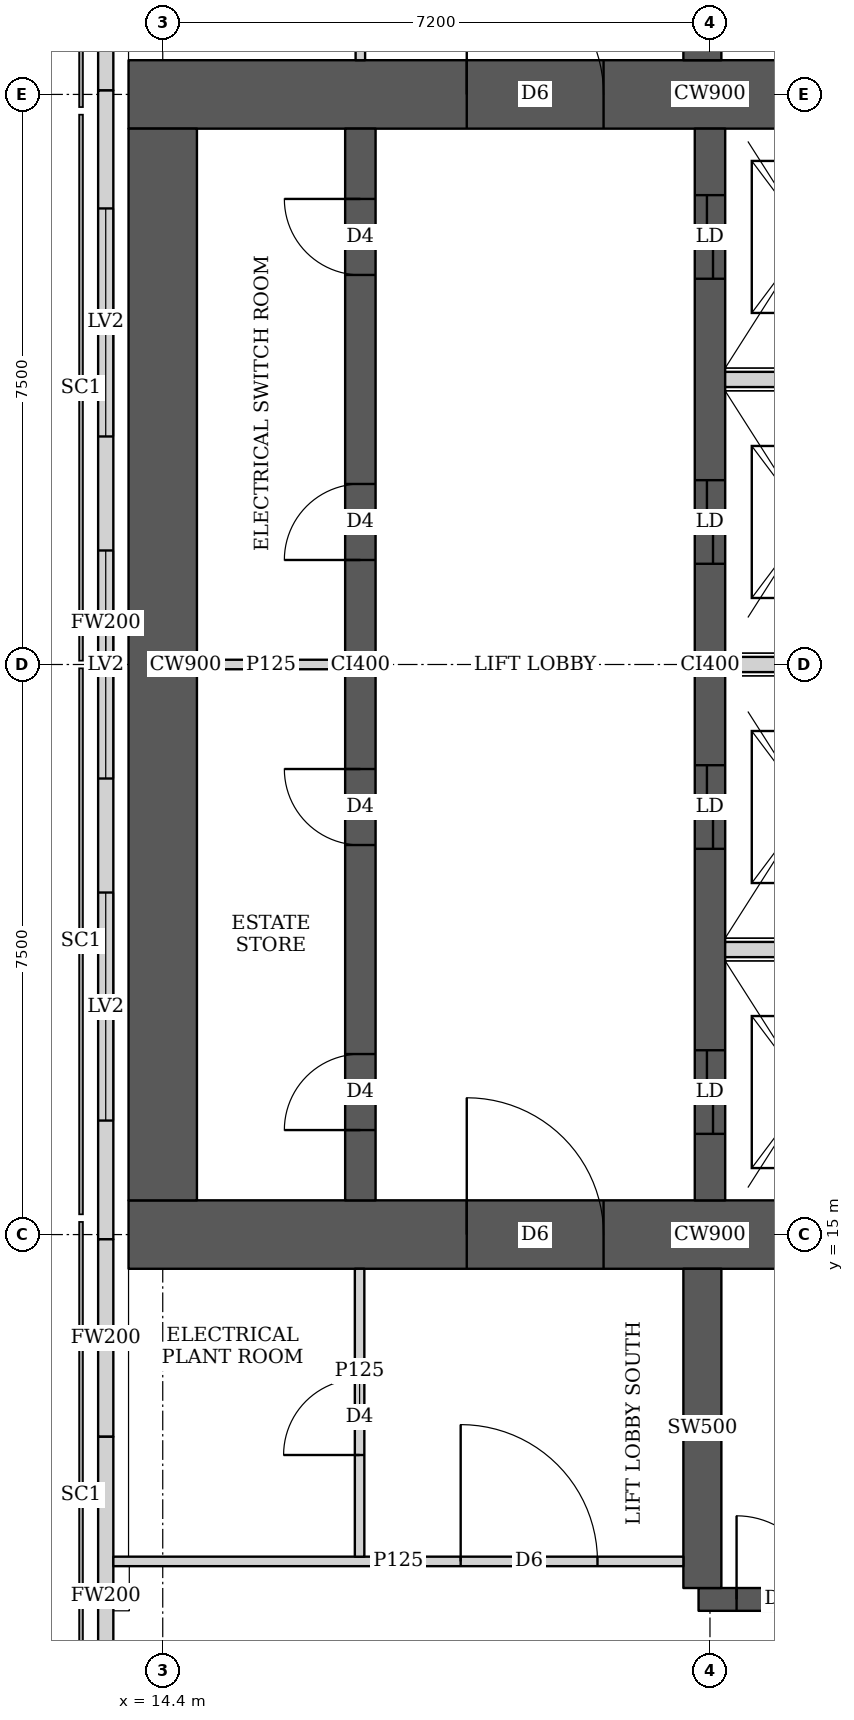
"""IFC4 building model, lengths in metres.
Left out: names, types, materials, properties, quantities, classifications, styles, units other than length and angle.
Written with IfcOpenShell. Run it as: python <this file> out.ifc"""

import sys

from ifc_helpers import new_model, si_unit, direction, frame, frame_2d, origin, place, context, subcontext, project, spatial, rectangle, extrude, element, fill, save


model = new_model("IFC4")
c1 = context("Model", 3, precision=1e-05, world=origin(), true_north=direction((0.0, 1.0)))
c2 = subcontext(c1, "Body", "Model", "MODEL_VIEW")
j1 = project(units=[si_unit("LENGTHUNIT", "METRE"), si_unit("PLANEANGLEUNIT", "RADIAN")], contexts=[c1])
p1 = place(None, origin())
s1 = spatial("IfcSite", under=j1, at=p1, CompositionType="ELEMENT")
p2 = place(p1, origin())
s2 = spatial("IfcBuilding", under=s1, at=p2, CompositionType="ELEMENT")
p3 = place(p2, frame((0.0, 0.0, 246.2)))
s3 = spatial("IfcBuildingStorey", under=s2, at=p3, CompositionType="ELEMENT", Elevation=246.2)
p4 = place(p3, frame((13.95, 15.0, 0.0), z_axis=(0.0, 0.0, 1.0), x_axis=(1.0, 0.0, 0.0)))
e1 = element("IfcWall", 1, at=p4, inside=s3, PredefinedType="SHEAR", context=c2, shape_type="SweptSolid", body=[
    extrude(rectangle(XDim=15.3, YDim=0.9, at=frame_2d((7.65, 0.0))), origin(), (0.0, 0.0, 1.0), 5.4),
])
p5 = place(p4, frame((4.45, 0.0, 0.0)))
e2 = element("IfcOpeningElement", 2, at=p5, cuts=e1, PredefinedType="OPENING", context=c2, shape_type="SweptSolid", body=[
    extrude(rectangle(XDim=1.8, YDim=2.1, at=frame_2d((0.9, 1.05))), frame((0.0, 0.46, 0.0), z_axis=(0.0, -1.0, 0.0), x_axis=(1.0, 0.0, 0.0)), (0.0, 0.0, 1.0), 0.92),
])
p6 = place(p4, frame((10.7, 0.0, 0.0)))
e3 = element("IfcOpeningElement", 3, at=p6, cuts=e1, PredefinedType="OPENING", context=c2, shape_type="SweptSolid", body=[
    extrude(rectangle(XDim=1.1, YDim=2.1, at=frame_2d((0.55, 1.05))), frame((0.0, 0.46, 0.0), z_axis=(0.0, -1.0, 0.0), x_axis=(1.0, 0.0, 0.0)), (0.0, 0.0, 1.0), 0.92),
])
p7 = place(p3, frame((13.95, 30.0, 0.0), z_axis=(0.0, 0.0, 1.0), x_axis=(1.0, 0.0, 0.0)))
e4 = element("IfcWall", 4, at=p7, inside=s3, PredefinedType="SHEAR", context=c2, shape_type="SweptSolid", body=[
    extrude(rectangle(XDim=15.3, YDim=0.9, at=frame_2d((7.65, 0.0))), origin(), (0.0, 0.0, 1.0), 5.4),
])
p8 = place(p7, frame((4.45, 0.0, 0.0)))
e5 = element("IfcOpeningElement", 5, at=p8, cuts=e4, PredefinedType="OPENING", context=c2, shape_type="SweptSolid", body=[
    extrude(rectangle(XDim=1.8, YDim=2.1, at=frame_2d((0.9, 1.05))), frame((0.0, 0.46, 0.0), z_axis=(0.0, -1.0, 0.0), x_axis=(1.0, 0.0, 0.0)), (0.0, 0.0, 1.0), 0.92),
])
p9 = place(p7, frame((10.7, 0.0, 0.0)))
e6 = element("IfcOpeningElement", 6, at=p9, cuts=e4, PredefinedType="OPENING", context=c2, shape_type="SweptSolid", body=[
    extrude(rectangle(XDim=1.1, YDim=2.1, at=frame_2d((0.55, 1.05))), frame((0.0, 0.46, 0.0), z_axis=(0.0, -1.0, 0.0), x_axis=(1.0, 0.0, 0.0)), (0.0, 0.0, 1.0), 0.92),
])
p10 = place(p3, frame((14.4, 15.45, 0.0), z_axis=(0.0, 0.0, 1.0), x_axis=(0.0, 1.0, 0.0)))
e7 = element("IfcWall", 7, at=p10, inside=s3, PredefinedType="SHEAR", context=c2, shape_type="SweptSolid", body=[
    extrude(rectangle(XDim=14.1, YDim=0.9, at=frame_2d((7.05, 0.0))), origin(), (0.0, 0.0, 1.0), 5.4),
])
p11 = place(p3, frame((17.0, 15.45, 0.0), z_axis=(0.0, 0.0, 1.0), x_axis=(0.0, 1.0, 0.0)))
e8 = element("IfcWall", 8, at=p11, inside=s3, PredefinedType="SHEAR", context=c2, shape_type="SweptSolid", body=[
    extrude(rectangle(XDim=14.1, YDim=0.4, at=frame_2d((7.05, 0.0))), origin(), (0.0, 0.0, 1.0), 5.4),
])
p12 = place(p11, frame((0.925, 0.0, 0.0)))
e9 = element("IfcOpeningElement", 9, at=p12, cuts=e8, PredefinedType="OPENING", context=c2, shape_type="SweptSolid", body=[
    extrude(rectangle(XDim=1.0, YDim=2.1, at=frame_2d((0.5, 1.05))), frame((0.0, 0.21, 0.0), z_axis=(0.0, -1.0, 0.0), x_axis=(1.0, 0.0, 0.0)), (0.0, 0.0, 1.0), 0.42),
])
p13 = place(p11, frame((4.675, 0.0, 0.0)))
e10 = element("IfcOpeningElement", 10, at=p13, cuts=e8, PredefinedType="OPENING", context=c2, shape_type="SweptSolid", body=[
    extrude(rectangle(XDim=1.0, YDim=2.1, at=frame_2d((0.5, 1.05))), frame((0.0, 0.21, 0.0), z_axis=(0.0, -1.0, 0.0), x_axis=(1.0, 0.0, 0.0)), (0.0, 0.0, 1.0), 0.42),
])
p14 = place(p11, frame((8.425, 0.0, 0.0)))
e11 = element("IfcOpeningElement", 11, at=p14, cuts=e8, PredefinedType="OPENING", context=c2, shape_type="SweptSolid", body=[
    extrude(rectangle(XDim=1.0, YDim=2.1, at=frame_2d((0.5, 1.05))), frame((0.0, 0.21, 0.0), z_axis=(0.0, -1.0, 0.0), x_axis=(1.0, 0.0, 0.0)), (0.0, 0.0, 1.0), 0.42),
])
p15 = place(p11, frame((12.175, 0.0, 0.0)))
e12 = element("IfcOpeningElement", 12, at=p15, cuts=e8, PredefinedType="OPENING", context=c2, shape_type="SweptSolid", body=[
    extrude(rectangle(XDim=1.0, YDim=2.1, at=frame_2d((0.5, 1.05))), frame((0.0, 0.21, 0.0), z_axis=(0.0, -1.0, 0.0), x_axis=(1.0, 0.0, 0.0)), (0.0, 0.0, 1.0), 0.42),
])
p16 = place(p3, frame((21.6, 15.45, 0.0), z_axis=(0.0, 0.0, 1.0), x_axis=(0.0, 1.0, 0.0)))
e13 = element("IfcWall", 13, at=p16, inside=s3, PredefinedType="SHEAR", context=c2, shape_type="SweptSolid", body=[
    extrude(rectangle(XDim=14.1, YDim=0.4, at=frame_2d((7.05, 0.0))), origin(), (0.0, 0.0, 1.0), 5.4),
])
p17 = place(p16, frame((0.875, 0.0, 0.0)))
e14 = element("IfcOpeningElement", 14, at=p17, cuts=e13, PredefinedType="OPENING", context=c2, shape_type="SweptSolid", body=[
    extrude(rectangle(XDim=1.1, YDim=2.1, at=frame_2d((0.55, 1.05))), frame((0.0, 0.21, 0.0), z_axis=(0.0, -1.0, 0.0), x_axis=(1.0, 0.0, 0.0)), (0.0, 0.0, 1.0), 0.42),
])
p18 = place(p16, frame((4.625, 0.0, 0.0)))
e15 = element("IfcOpeningElement", 15, at=p18, cuts=e13, PredefinedType="OPENING", context=c2, shape_type="SweptSolid", body=[
    extrude(rectangle(XDim=1.1, YDim=2.1, at=frame_2d((0.55, 1.05))), frame((0.0, 0.21, 0.0), z_axis=(0.0, -1.0, 0.0), x_axis=(1.0, 0.0, 0.0)), (0.0, 0.0, 1.0), 0.42),
])
p19 = place(p16, frame((8.375, 0.0, 0.0)))
e16 = element("IfcOpeningElement", 16, at=p19, cuts=e13, PredefinedType="OPENING", context=c2, shape_type="SweptSolid", body=[
    extrude(rectangle(XDim=1.1, YDim=2.1, at=frame_2d((0.55, 1.05))), frame((0.0, 0.21, 0.0), z_axis=(0.0, -1.0, 0.0), x_axis=(1.0, 0.0, 0.0)), (0.0, 0.0, 1.0), 0.42),
])
p20 = place(p16, frame((12.125, 0.0, 0.0)))
e17 = element("IfcOpeningElement", 17, at=p20, cuts=e13, PredefinedType="OPENING", context=c2, shape_type="SweptSolid", body=[
    extrude(rectangle(XDim=1.1, YDim=2.1, at=frame_2d((0.55, 1.05))), frame((0.0, 0.21, 0.0), z_axis=(0.0, -1.0, 0.0), x_axis=(1.0, 0.0, 0.0)), (0.0, 0.0, 1.0), 0.42),
])
p21 = place(p3, frame((21.45, 10.2, 0.0), z_axis=(0.0, 0.0, 1.0), x_axis=(1.0, 0.0, 0.0)))
e18 = element("IfcWall", 18, at=p21, inside=s3, PredefinedType="SHEAR", context=c2, shape_type="SweptSolid", body=[
    extrude(rectangle(XDim=7.5, YDim=0.3, at=frame_2d((3.75, 0.0))), origin(), (0.0, 0.0, 1.0), 5.4),
])
p22 = place(p21, frame((0.5, 0.0, 0.0)))
e19 = element("IfcOpeningElement", 19, at=p22, cuts=e18, PredefinedType="OPENING", context=c2, shape_type="SweptSolid", body=[
    extrude(rectangle(XDim=1.1, YDim=2.1, at=frame_2d((0.55, 1.05))), frame((0.0, 0.16, 0.0), z_axis=(0.0, -1.0, 0.0), x_axis=(1.0, 0.0, 0.0)), (0.0, 0.0, 1.0), 0.32),
])
for number, where, z_axis, x_axis in (
    (20, (21.5, 10.35, 0.0), (0.0, 0.0, 1.0), (0.0, 1.0, 0.0)),
    (21, (21.5, 30.45, 0.0), (0.0, 0.0, 1.0), (0.0, 1.0, 0.0)),
):
    element("IfcWall", number, at=place(p3, frame(where, z_axis=z_axis, x_axis=x_axis)), inside=s3, PredefinedType="SHEAR", context=c2, shape_type="SweptSolid", body=[
        extrude(rectangle(XDim=4.2, YDim=0.5, at=frame_2d((2.1, 0.0))), origin(), (0.0, 0.0, 1.0), 5.4),
    ])
p23 = place(p3, frame((13.65, 33.161, 0.0), z_axis=(0.0, 0.0, 1.0), x_axis=(0.0, -1.0, 0.0)))
e22 = element("IfcWall", 22, at=p23, inside=s3, PredefinedType="SOLIDWALL", context=c2, shape_type="SweptSolid", body=[
    extrude(rectangle(XDim=3.109, YDim=0.2, at=frame_2d((1.554, 0.0))), origin(), (0.0, 0.0, 1.0), 3.55),
])
p24 = place(p3, frame((13.65, 30.052, 0.0), z_axis=(0.0, 0.0, 1.0), x_axis=(0.0, -1.0, 0.0)))
e23 = element("IfcWall", 23, at=p24, inside=s3, PredefinedType="SOLIDWALL", context=c2, shape_type="SweptSolid", body=[
    extrude(rectangle(XDim=15.114, YDim=0.2, at=frame_2d((7.557, 0.0))), origin(), (0.0, 0.0, 1.0), 5.15),
])
p25 = place(p24, frame((1.552, 0.0, 0.6)))
e24 = element("IfcOpeningElement", 24, at=p25, cuts=e23, PredefinedType="OPENING", context=c2, shape_type="SweptSolid", body=[
    extrude(rectangle(XDim=3.0, YDim=2.7, at=frame_2d((1.5, 1.35))), frame((0.0, 0.11, 0.0), z_axis=(0.0, -1.0, 0.0), x_axis=(1.0, 0.0, 0.0)), (0.0, 0.0, 1.0), 0.22),
])
p26 = place(p24, frame((6.052, 0.0, 0.6)))
e25 = element("IfcOpeningElement", 25, at=p26, cuts=e23, PredefinedType="OPENING", context=c2, shape_type="SweptSolid", body=[
    extrude(rectangle(XDim=3.0, YDim=2.7, at=frame_2d((1.5, 1.35))), frame((0.0, 0.11, 0.0), z_axis=(0.0, -1.0, 0.0), x_axis=(1.0, 0.0, 0.0)), (0.0, 0.0, 1.0), 0.22),
])
p27 = place(p24, frame((10.552, 0.0, 0.6)))
e26 = element("IfcOpeningElement", 26, at=p27, cuts=e23, PredefinedType="OPENING", context=c2, shape_type="SweptSolid", body=[
    extrude(rectangle(XDim=3.0, YDim=2.7, at=frame_2d((1.5, 1.35))), frame((0.0, 0.11, 0.0), z_axis=(0.0, -1.0, 0.0), x_axis=(1.0, 0.0, 0.0)), (0.0, 0.0, 1.0), 0.22),
])
p28 = place(p3, frame((13.65, 14.938, 0.0), z_axis=(0.0, 0.0, 1.0), x_axis=(0.0, -1.0, 0.0)))
e27 = element("IfcWall", 27, at=p28, inside=s3, PredefinedType="SOLIDWALL", context=c2, shape_type="SweptSolid", body=[
    extrude(rectangle(XDim=2.598, YDim=0.2, at=frame_2d((1.299, 0.0))), origin(), (0.0, 0.0, 1.0), 3.55),
])
p29 = place(p3, frame((13.65, 12.34, 0.0), z_axis=(0.0, 0.0, 1.0), x_axis=(0.0, -1.0, 0.0)))
e28 = element("IfcWall", 28, at=p29, inside=s3, PredefinedType="SOLIDWALL", context=c2, shape_type="SweptSolid", body=[
    extrude(rectangle(XDim=4.186, YDim=0.2, at=frame_2d((2.093, 0.0))), origin(), (0.0, 0.0, 1.0), 5.15),
])
p30 = place(p3, frame((13.75, 10.7, 0.0), z_axis=(0.0, 0.0, 1.0), x_axis=(1.0, 0.0, 0.0)))
e29 = element("IfcWall", 29, at=p30, inside=s3, PredefinedType="PARTITIONING", context=c2, shape_type="SweptSolid", body=[
    extrude(rectangle(XDim=7.5, YDim=0.125, at=frame_2d((3.75, 0.0))), origin(), (0.0, 0.0, 1.0), 2.75),
])
p31 = place(p30, frame((4.57, 0.0, 0.0)))
e30 = element("IfcOpeningElement", 30, at=p31, cuts=e29, PredefinedType="OPENING", context=c2, shape_type="SweptSolid", body=[
    extrude(rectangle(XDim=1.8, YDim=2.1, at=frame_2d((0.9, 1.05))), frame((0.0, 0.073, 0.0), z_axis=(0.0, -1.0, 0.0), x_axis=(1.0, 0.0, 0.0)), (0.0, 0.0, 1.0), 0.145),
])
p32 = place(p3, frame((16.99, 10.762, 0.0), z_axis=(0.0, 0.0, 1.0), x_axis=(0.0, 1.0, 0.0)))
e31 = element("IfcWall", 31, at=p32, inside=s3, PredefinedType="PARTITIONING", context=c2, shape_type="SweptSolid", body=[
    extrude(rectangle(XDim=3.788, YDim=0.125, at=frame_2d((1.894, 0.0))), origin(), (0.0, 0.0, 1.0), 5.15),
])
p33 = place(p32, frame((1.338, 0.0, 0.0)))
e32 = element("IfcOpeningElement", 32, at=p33, cuts=e31, PredefinedType="OPENING", context=c2, shape_type="SweptSolid", body=[
    extrude(rectangle(XDim=1.0, YDim=2.1, at=frame_2d((0.5, 1.05))), frame((0.0, 0.073, 0.0), z_axis=(0.0, -1.0, 0.0), x_axis=(1.0, 0.0, 0.0)), (0.0, 0.0, 1.0), 0.145),
])
p34 = place(p3, frame((17.0, 30.45, 0.0), z_axis=(0.0, 0.0, 1.0), x_axis=(0.0, 1.0, 0.0)))
e33 = element("IfcWall", 33, at=p34, inside=s3, PredefinedType="PARTITIONING", context=c2, shape_type="SweptSolid", body=[
    extrude(rectangle(XDim=4.387, YDim=0.125, at=frame_2d((2.193, 0.0))), origin(), (0.0, 0.0, 1.0), 5.15),
])
p35 = place(p34, frame((1.75, 0.0, 0.0)))
e34 = element("IfcOpeningElement", 34, at=p35, cuts=e33, PredefinedType="OPENING", context=c2, shape_type="SweptSolid", body=[
    extrude(rectangle(XDim=1.0, YDim=2.1, at=frame_2d((0.5, 1.05))), frame((0.0, 0.073, 0.0), z_axis=(0.0, -1.0, 0.0), x_axis=(1.0, 0.0, 0.0)), (0.0, 0.0, 1.0), 0.145),
])
p36 = place(p3, frame((14.85, 22.5, 0.0), z_axis=(0.0, 0.0, 1.0), x_axis=(1.0, 0.0, 0.0)))
e35 = element("IfcWall", 35, at=p36, inside=s3, PredefinedType="PARTITIONING", context=c2, shape_type="SweptSolid", body=[
    extrude(rectangle(XDim=1.95, YDim=0.125, at=frame_2d((0.975, 0.0))), origin(), (0.0, 0.0, 1.0), 5.15),
])
for number, where, z_axis, x_axis in (
    (36, (21.8, 18.75, 0.0), (0.0, 0.0, 1.0), (1.0, 0.0, 0.0)),
    (37, (21.8, 22.5, 0.0), (0.0, 0.0, 1.0), (1.0, 0.0, 0.0)),
    (38, (21.8, 26.25, 0.0), (0.0, 0.0, 1.0), (1.0, 0.0, 0.0)),
):
    element("IfcWall", number, at=place(p3, frame(where, z_axis=z_axis, x_axis=x_axis)), inside=s3, PredefinedType="SOLIDWALL", context=c2, shape_type="SweptSolid", body=[
        extrude(rectangle(XDim=2.2, YDim=0.2, at=frame_2d((1.1, 0.0))), origin(), (0.0, 0.0, 1.0), 5.15),
    ])
p37 = place(p25, origin())
e39 = element("IfcWindow", 39, at=p37, inside=s3, PartitioningType="SINGLE_PANEL", PredefinedType="USERDEFINED", context=c2, shape_type="SweptSolid", body=[
    extrude(rectangle(XDim=3.0, YDim=2.7, at=frame_2d((1.5, 1.35))), frame((0.0, 0.03, 0.0), z_axis=(0.0, -1.0, 0.0), x_axis=(1.0, 0.0, 0.0)), (0.0, 0.0, 1.0), 0.06),
])
fill(e24, e39)
p38 = place(p26, origin())
e40 = element("IfcWindow", 40, at=p38, inside=s3, PartitioningType="SINGLE_PANEL", PredefinedType="USERDEFINED", context=c2, shape_type="SweptSolid", body=[
    extrude(rectangle(XDim=3.0, YDim=2.7, at=frame_2d((1.5, 1.35))), frame((0.0, 0.03, 0.0), z_axis=(0.0, -1.0, 0.0), x_axis=(1.0, 0.0, 0.0)), (0.0, 0.0, 1.0), 0.06),
])
fill(e25, e40)
p39 = place(p27, origin())
e41 = element("IfcWindow", 41, at=p39, inside=s3, PartitioningType="SINGLE_PANEL", PredefinedType="USERDEFINED", context=c2, shape_type="SweptSolid", body=[
    extrude(rectangle(XDim=3.0, YDim=2.7, at=frame_2d((1.5, 1.35))), frame((0.0, 0.03, 0.0), z_axis=(0.0, -1.0, 0.0), x_axis=(1.0, 0.0, 0.0)), (0.0, 0.0, 1.0), 0.06),
])
fill(e26, e41)
p40 = place(p33, origin())
e42 = element("IfcDoor", 42, at=p40, inside=s3, OperationType="SINGLE_SWING_LEFT", PredefinedType="DOOR", context=c2, shape_type="SweptSolid", body=[
    extrude(rectangle(XDim=1.0, YDim=2.1, at=frame_2d((0.5, 1.05))), frame((0.0, 0.025, 0.0), z_axis=(0.0, -1.0, 0.0), x_axis=(1.0, 0.0, 0.0)), (0.0, 0.0, 1.0), 0.05),
])
fill(e32, e42)
p41 = place(p31, origin())
e43 = element("IfcDoor", 43, at=p41, inside=s3, OperationType="DOUBLE_DOOR_SINGLE_SWING", PredefinedType="DOOR", context=c2, shape_type="SweptSolid", body=[
    extrude(rectangle(XDim=1.8, YDim=2.1, at=frame_2d((0.9, 1.05))), frame((0.0, 0.025, 0.0), z_axis=(0.0, -1.0, 0.0), x_axis=(1.0, 0.0, 0.0)), (0.0, 0.0, 1.0), 0.05),
])
fill(e30, e43)
p42 = place(p12, origin())
e44 = element("IfcDoor", 44, at=p42, inside=s3, OperationType="SINGLE_SWING_LEFT", PredefinedType="DOOR", context=c2, shape_type="SweptSolid", body=[
    extrude(rectangle(XDim=1.0, YDim=2.1, at=frame_2d((0.5, 1.05))), frame((0.0, 0.025, 0.0), z_axis=(0.0, -1.0, 0.0), x_axis=(1.0, 0.0, 0.0)), (0.0, 0.0, 1.0), 0.05),
])
fill(e9, e44)
p43 = place(p13, origin())
e45 = element("IfcDoor", 45, at=p43, inside=s3, OperationType="SINGLE_SWING_RIGHT", PredefinedType="DOOR", context=c2, shape_type="SweptSolid", body=[
    extrude(rectangle(XDim=1.0, YDim=2.1, at=frame_2d((0.5, 1.05))), frame((0.0, 0.025, 0.0), z_axis=(0.0, -1.0, 0.0), x_axis=(1.0, 0.0, 0.0)), (0.0, 0.0, 1.0), 0.05),
])
fill(e10, e45)
p44 = place(p14, origin())
e46 = element("IfcDoor", 46, at=p44, inside=s3, OperationType="SINGLE_SWING_LEFT", PredefinedType="DOOR", context=c2, shape_type="SweptSolid", body=[
    extrude(rectangle(XDim=1.0, YDim=2.1, at=frame_2d((0.5, 1.05))), frame((0.0, 0.025, 0.0), z_axis=(0.0, -1.0, 0.0), x_axis=(1.0, 0.0, 0.0)), (0.0, 0.0, 1.0), 0.05),
])
fill(e11, e46)
p45 = place(p15, origin())
e47 = element("IfcDoor", 47, at=p45, inside=s3, OperationType="SINGLE_SWING_RIGHT", PredefinedType="DOOR", context=c2, shape_type="SweptSolid", body=[
    extrude(rectangle(XDim=1.0, YDim=2.1, at=frame_2d((0.5, 1.05))), frame((0.0, 0.025, 0.0), z_axis=(0.0, -1.0, 0.0), x_axis=(1.0, 0.0, 0.0)), (0.0, 0.0, 1.0), 0.05),
])
fill(e12, e47)
p46 = place(p5, origin())
e48 = element("IfcDoor", 48, at=p46, inside=s3, OperationType="DOUBLE_DOOR_SINGLE_SWING", PredefinedType="DOOR", context=c2, shape_type="SweptSolid", body=[
    extrude(rectangle(XDim=1.8, YDim=2.1, at=frame_2d((0.9, 1.05))), frame((0.0, 0.025, 0.0), z_axis=(0.0, -1.0, 0.0), x_axis=(1.0, 0.0, 0.0)), (0.0, 0.0, 1.0), 0.05),
])
fill(e2, e48)
p47 = place(p8, origin())
e49 = element("IfcDoor", 49, at=p47, inside=s3, OperationType="DOUBLE_DOOR_SINGLE_SWING", PredefinedType="DOOR", context=c2, shape_type="SweptSolid", body=[
    extrude(rectangle(XDim=1.8, YDim=2.1, at=frame_2d((0.9, 1.05))), frame((0.0, 0.025, 0.0), z_axis=(0.0, -1.0, 0.0), x_axis=(1.0, 0.0, 0.0)), (0.0, 0.0, 1.0), 0.05),
])
fill(e5, e49)
p48 = place(p17, origin())
e50 = element("IfcDoor", 50, at=p48, inside=s3, OperationType="DOUBLE_DOOR_SLIDING", PredefinedType="DOOR", context=c2, shape_type="SweptSolid", body=[
    extrude(rectangle(XDim=1.1, YDim=2.1, at=frame_2d((0.55, 1.05))), frame((0.0, 0.025, 0.0), z_axis=(0.0, -1.0, 0.0), x_axis=(1.0, 0.0, 0.0)), (0.0, 0.0, 1.0), 0.05),
])
fill(e14, e50)
p49 = place(p18, origin())
e51 = element("IfcDoor", 51, at=p49, inside=s3, OperationType="DOUBLE_DOOR_SLIDING", PredefinedType="DOOR", context=c2, shape_type="SweptSolid", body=[
    extrude(rectangle(XDim=1.1, YDim=2.1, at=frame_2d((0.55, 1.05))), frame((0.0, 0.025, 0.0), z_axis=(0.0, -1.0, 0.0), x_axis=(1.0, 0.0, 0.0)), (0.0, 0.0, 1.0), 0.05),
])
fill(e15, e51)
p50 = place(p19, origin())
e52 = element("IfcDoor", 52, at=p50, inside=s3, OperationType="DOUBLE_DOOR_SLIDING", PredefinedType="DOOR", context=c2, shape_type="SweptSolid", body=[
    extrude(rectangle(XDim=1.1, YDim=2.1, at=frame_2d((0.55, 1.05))), frame((0.0, 0.025, 0.0), z_axis=(0.0, -1.0, 0.0), x_axis=(1.0, 0.0, 0.0)), (0.0, 0.0, 1.0), 0.05),
])
fill(e16, e52)
p51 = place(p20, origin())
e53 = element("IfcDoor", 53, at=p51, inside=s3, OperationType="DOUBLE_DOOR_SLIDING", PredefinedType="DOOR", context=c2, shape_type="SweptSolid", body=[
    extrude(rectangle(XDim=1.1, YDim=2.1, at=frame_2d((0.55, 1.05))), frame((0.0, 0.025, 0.0), z_axis=(0.0, -1.0, 0.0), x_axis=(1.0, 0.0, 0.0)), (0.0, 0.0, 1.0), 0.05),
])
fill(e17, e53)
p52 = place(p22, origin())
e54 = element("IfcDoor", 54, at=p52, inside=s3, OperationType="SINGLE_SWING_LEFT", PredefinedType="DOOR", context=c2, shape_type="SweptSolid", body=[
    extrude(rectangle(XDim=1.1, YDim=2.1, at=frame_2d((0.55, 1.05))), frame((0.0, 0.025, 0.0), z_axis=(0.0, -1.0, 0.0), x_axis=(1.0, 0.0, 0.0)), (0.0, 0.0, 1.0), 0.05),
])
fill(e19, e54)
save(model, sys.argv[1])
